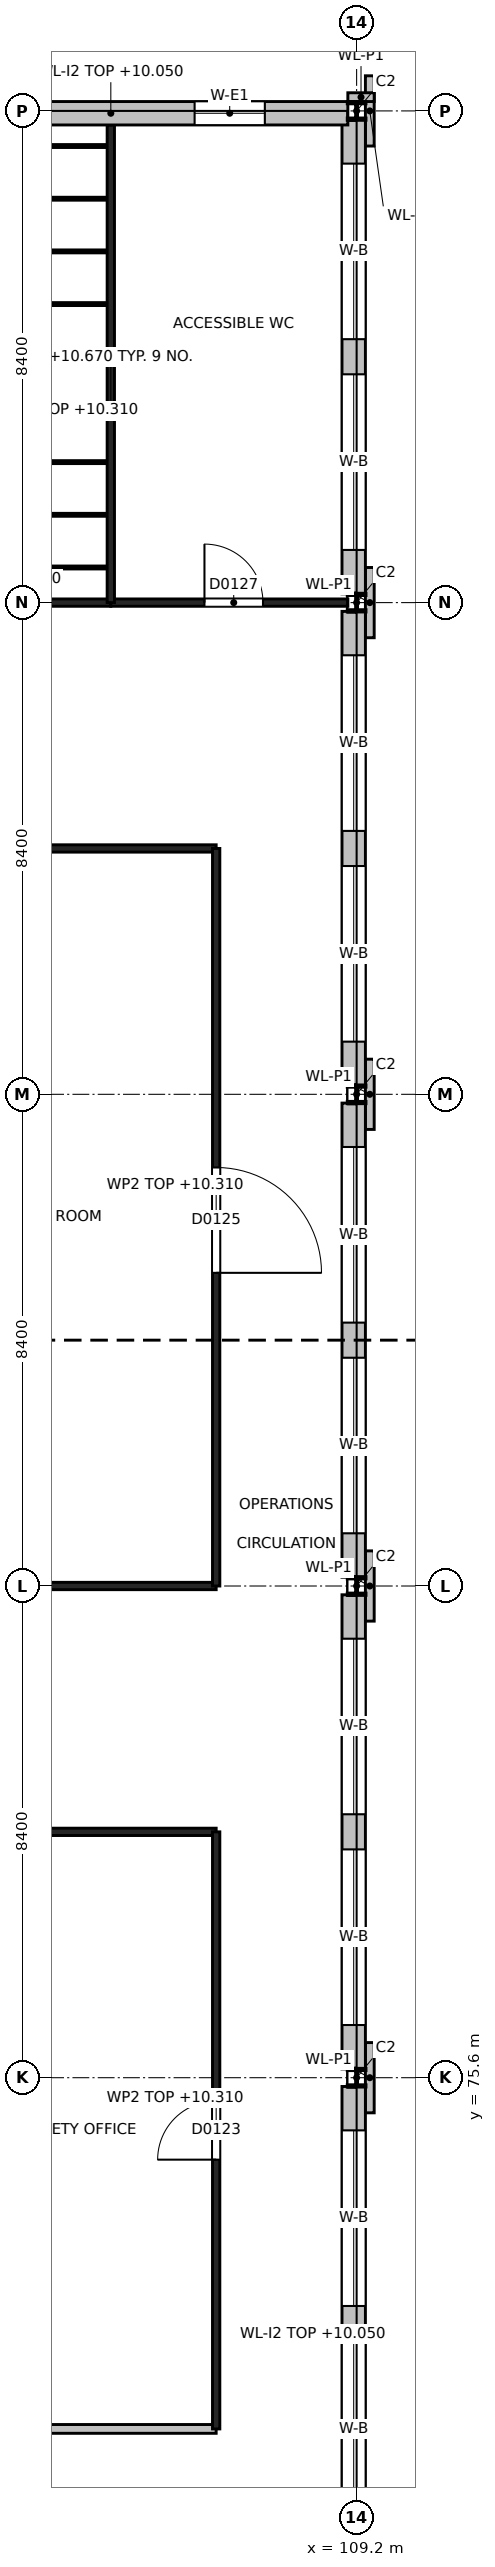
"""IFC4 building model, lengths in metres.
Left out: names, types, materials, properties, quantities, classifications, styles, units other than length and angle.
Written with IfcOpenShell. Run it as: python <this file> out.ifc"""

import sys

from ifc_helpers import new_model, si_unit, direction, frame, frame_2d, origin, origin_2d, place, context, subcontext, project, spatial, rectangle, i_section, extrude, element, fill, save


model = new_model("IFC4")
c1 = context("Model", 3, precision=1e-05, world=origin(), true_north=direction((0.0, 1.0)))
c2 = subcontext(c1, "Body", "Model", "MODEL_VIEW")
j1 = project(units=[si_unit("LENGTHUNIT", "METRE"), si_unit("PLANEANGLEUNIT", "RADIAN")], contexts=[c1])
p1 = place(None, origin())
s1 = spatial("IfcSite", under=j1, at=p1, CompositionType="ELEMENT")
p2 = place(p1, origin())
s2 = spatial("IfcBuilding", under=s1, at=p2, CompositionType="ELEMENT")
p3 = place(p2, frame((0.0, 0.0, 6.0)))
s3 = spatial("IfcBuildingStorey", under=s2, at=p3, CompositionType="ELEMENT", Elevation=6.0)
for number, where, z_axis, x_axis in (
    (1, (109.2, 75.6, 0.0), (0.0, 0.0, 1.0), (1.0, 0.0, 0.0)),
    (2, (109.2, 84.0, 0.0), (0.0, 0.0, 1.0), (1.0, 0.0, 0.0)),
    (3, (109.2, 92.4, 0.0), (0.0, 0.0, 1.0), (1.0, 0.0, 0.0)),
    (4, (109.2, 100.8, 0.0), (0.0, 0.0, 1.0), (1.0, 0.0, 0.0)),
    (5, (109.2, 109.2, 0.0), (0.0, 0.0, 1.0), (1.0, 0.0, 0.0)),
):
    element("IfcColumn", number, at=place(p3, frame(where, z_axis=z_axis, x_axis=x_axis)), inside=s3, PredefinedType="COLUMN", context=c2, shape_type="SweptSolid", body=[
        extrude(i_section(OverallWidth=0.3, OverallDepth=0.3, WebThickness=0.011, FlangeThickness=0.019, at=origin_2d()), origin(), (0.0, 0.0, 1.0), 4.8),
    ])
p4 = place(p3, frame((100.95, 109.16, 0.0), z_axis=(0.0, 0.0, 1.0), x_axis=(1.0, 0.0, 0.0)))
e6 = element("IfcWall", 6, at=p4, inside=s3, PredefinedType="SOLIDWALL", context=c2, shape_type="SweptSolid", body=[
    extrude(rectangle(XDim=8.1, YDim=0.4, at=frame_2d((4.05, 0.0))), origin(), (0.0, 0.0, 1.0), 4.05),
])
p5 = place(p4, frame((1.419, 0.0, 0.9)))
e7 = element("IfcOpeningElement", 7, at=p5, cuts=e6, PredefinedType="OPENING", context=c2, shape_type="SweptSolid", body=[
    extrude(rectangle(XDim=1.2, YDim=3.0, at=frame_2d((0.6, 1.5))), frame((0.0, 0.2, 0.0), z_axis=(0.0, -1.0, 0.0), x_axis=(1.0, 0.0, 0.0)), (0.0, 0.0, 1.0), 0.4),
])
p6 = place(p4, frame((5.481, 0.0, 0.9)))
e8 = element("IfcOpeningElement", 8, at=p6, cuts=e6, PredefinedType="OPENING", context=c2, shape_type="SweptSolid", body=[
    extrude(rectangle(XDim=1.2, YDim=3.0, at=frame_2d((0.6, 1.5))), frame((0.0, 0.2, 0.0), z_axis=(0.0, -1.0, 0.0), x_axis=(1.0, 0.0, 0.0)), (0.0, 0.0, 1.0), 0.4),
])
p7 = place(p3, frame((109.05, 109.435, 0.0), z_axis=(0.0, 0.0, 1.0), x_axis=(1.0, 0.0, 0.0)))
e9 = element("IfcWall", 9, at=p7, inside=s3, PredefinedType="SOLIDWALL", context=c2, shape_type="SweptSolid", body=[
    extrude(rectangle(XDim=0.45, YDim=0.15, at=frame_2d((0.225, 0.0))), origin(), (0.0, 0.0, 1.0), 4.8),
])
p8 = place(p3, frame((109.15, 67.0, 0.0), z_axis=(0.0, 0.0, 1.0), x_axis=(0.0, 1.0, 0.0)))
e10 = element("IfcWall", 10, at=p8, inside=s3, PredefinedType="SOLIDWALL", context=c2, shape_type="SweptSolid", body=[
    extrude(rectangle(XDim=8.45, YDim=0.4, at=frame_2d((4.225, 0.0))), origin(), (0.0, 0.0, 1.0), 4.05),
])
p9 = place(p8, frame((1.1, 0.0, 0.9)))
e11 = element("IfcOpeningElement", 11, at=p9, cuts=e10, PredefinedType="OPENING", context=c2, shape_type="SweptSolid", body=[
    extrude(rectangle(XDim=3.0, YDim=3.0, at=frame_2d((1.5, 1.5))), frame((0.0, 0.2, 0.0), z_axis=(0.0, -1.0, 0.0), x_axis=(1.0, 0.0, 0.0)), (0.0, 0.0, 1.0), 0.4),
])
p10 = place(p8, frame((4.7, 0.0, 0.9)))
e12 = element("IfcOpeningElement", 12, at=p10, cuts=e10, PredefinedType="OPENING", context=c2, shape_type="SweptSolid", body=[
    extrude(rectangle(XDim=3.0, YDim=3.0, at=frame_2d((1.5, 1.5))), frame((0.0, 0.2, 0.0), z_axis=(0.0, -1.0, 0.0), x_axis=(1.0, 0.0, 0.0)), (0.0, 0.0, 1.0), 0.4),
])
p11 = place(p3, frame((109.15, 75.75, 0.0), z_axis=(0.0, 0.0, 1.0), x_axis=(0.0, 1.0, 0.0)))
e13 = element("IfcWall", 13, at=p11, inside=s3, PredefinedType="SOLIDWALL", context=c2, shape_type="SweptSolid", body=[
    extrude(rectangle(XDim=8.1, YDim=0.4, at=frame_2d((4.05, 0.0))), origin(), (0.0, 0.0, 1.0), 4.05),
])
p12 = place(p11, frame((0.75, 0.0, 0.9)))
e14 = element("IfcOpeningElement", 14, at=p12, cuts=e13, PredefinedType="OPENING", context=c2, shape_type="SweptSolid", body=[
    extrude(rectangle(XDim=3.0, YDim=3.0, at=frame_2d((1.5, 1.5))), frame((0.0, 0.2, 0.0), z_axis=(0.0, -1.0, 0.0), x_axis=(1.0, 0.0, 0.0)), (0.0, 0.0, 1.0), 0.4),
])
p13 = place(p11, frame((4.35, 0.0, 0.9)))
e15 = element("IfcOpeningElement", 15, at=p13, cuts=e13, PredefinedType="OPENING", context=c2, shape_type="SweptSolid", body=[
    extrude(rectangle(XDim=3.0, YDim=3.0, at=frame_2d((1.5, 1.5))), frame((0.0, 0.2, 0.0), z_axis=(0.0, -1.0, 0.0), x_axis=(1.0, 0.0, 0.0)), (0.0, 0.0, 1.0), 0.4),
])
p14 = place(p3, frame((109.15, 84.15, 0.0), z_axis=(0.0, 0.0, 1.0), x_axis=(0.0, 1.0, 0.0)))
e16 = element("IfcWall", 16, at=p14, inside=s3, PredefinedType="SOLIDWALL", context=c2, shape_type="SweptSolid", body=[
    extrude(rectangle(XDim=8.1, YDim=0.4, at=frame_2d((4.05, 0.0))), origin(), (0.0, 0.0, 1.0), 4.05),
])
p15 = place(p14, frame((0.75, 0.0, 0.9)))
e17 = element("IfcOpeningElement", 17, at=p15, cuts=e16, PredefinedType="OPENING", context=c2, shape_type="SweptSolid", body=[
    extrude(rectangle(XDim=3.0, YDim=3.0, at=frame_2d((1.5, 1.5))), frame((0.0, 0.2, 0.0), z_axis=(0.0, -1.0, 0.0), x_axis=(1.0, 0.0, 0.0)), (0.0, 0.0, 1.0), 0.4),
])
p16 = place(p14, frame((4.35, 0.0, 0.9)))
e18 = element("IfcOpeningElement", 18, at=p16, cuts=e16, PredefinedType="OPENING", context=c2, shape_type="SweptSolid", body=[
    extrude(rectangle(XDim=3.0, YDim=3.0, at=frame_2d((1.5, 1.5))), frame((0.0, 0.2, 0.0), z_axis=(0.0, -1.0, 0.0), x_axis=(1.0, 0.0, 0.0)), (0.0, 0.0, 1.0), 0.4),
])
p17 = place(p3, frame((109.15, 92.55, 0.0), z_axis=(0.0, 0.0, 1.0), x_axis=(0.0, 1.0, 0.0)))
e19 = element("IfcWall", 19, at=p17, inside=s3, PredefinedType="SOLIDWALL", context=c2, shape_type="SweptSolid", body=[
    extrude(rectangle(XDim=8.1, YDim=0.4, at=frame_2d((4.05, 0.0))), origin(), (0.0, 0.0, 1.0), 4.05),
])
p18 = place(p17, frame((0.75, 0.0, 0.9)))
e20 = element("IfcOpeningElement", 20, at=p18, cuts=e19, PredefinedType="OPENING", context=c2, shape_type="SweptSolid", body=[
    extrude(rectangle(XDim=3.0, YDim=3.0, at=frame_2d((1.5, 1.5))), frame((0.0, 0.2, 0.0), z_axis=(0.0, -1.0, 0.0), x_axis=(1.0, 0.0, 0.0)), (0.0, 0.0, 1.0), 0.4),
])
p19 = place(p17, frame((4.35, 0.0, 0.9)))
e21 = element("IfcOpeningElement", 21, at=p19, cuts=e19, PredefinedType="OPENING", context=c2, shape_type="SweptSolid", body=[
    extrude(rectangle(XDim=3.0, YDim=3.0, at=frame_2d((1.5, 1.5))), frame((0.0, 0.2, 0.0), z_axis=(0.0, -1.0, 0.0), x_axis=(1.0, 0.0, 0.0)), (0.0, 0.0, 1.0), 0.4),
])
p20 = place(p3, frame((109.15, 100.95, 0.0), z_axis=(0.0, 0.0, 1.0), x_axis=(0.0, 1.0, 0.0)))
e22 = element("IfcWall", 22, at=p20, inside=s3, PredefinedType="SOLIDWALL", context=c2, shape_type="SweptSolid", body=[
    extrude(rectangle(XDim=8.1, YDim=0.4, at=frame_2d((4.05, 0.0))), origin(), (0.0, 0.0, 1.0), 4.05),
])
p21 = place(p20, frame((0.75, 0.0, 0.9)))
e23 = element("IfcOpeningElement", 23, at=p21, cuts=e22, PredefinedType="OPENING", context=c2, shape_type="SweptSolid", body=[
    extrude(rectangle(XDim=3.0, YDim=3.0, at=frame_2d((1.5, 1.5))), frame((0.0, 0.2, 0.0), z_axis=(0.0, -1.0, 0.0), x_axis=(1.0, 0.0, 0.0)), (0.0, 0.0, 1.0), 0.4),
])
p22 = place(p20, frame((4.35, 0.0, 0.9)))
e24 = element("IfcOpeningElement", 24, at=p22, cuts=e22, PredefinedType="OPENING", context=c2, shape_type="SweptSolid", body=[
    extrude(rectangle(XDim=3.0, YDim=3.0, at=frame_2d((1.5, 1.5))), frame((0.0, 0.2, 0.0), z_axis=(0.0, -1.0, 0.0), x_axis=(1.0, 0.0, 0.0)), (0.0, 0.0, 1.0), 0.4),
])
p23 = place(p3, frame((109.425, 75.0, 0.0), z_axis=(0.0, 0.0, 1.0), x_axis=(0.0, 1.0, 0.0)))
e25 = element("IfcWall", 25, at=p23, inside=s3, PredefinedType="SOLIDWALL", context=c2, shape_type="SweptSolid", body=[
    extrude(rectangle(XDim=1.2, YDim=0.15, at=frame_2d((0.6, 0.0))), origin(), (0.0, 0.0, 1.0), 4.8),
])
p24 = place(p3, frame((109.425, 83.4, 0.0), z_axis=(0.0, 0.0, 1.0), x_axis=(0.0, 1.0, 0.0)))
e26 = element("IfcWall", 26, at=p24, inside=s3, PredefinedType="SOLIDWALL", context=c2, shape_type="SweptSolid", body=[
    extrude(rectangle(XDim=1.2, YDim=0.15, at=frame_2d((0.6, 0.0))), origin(), (0.0, 0.0, 1.0), 4.8),
])
for number, where, z_axis, x_axis in (
    (27, (109.425, 91.8, 0.0), (0.0, 0.0, 1.0), (0.0, 1.0, 0.0)),
    (28, (109.425, 100.2, 0.0), (0.0, 0.0, 1.0), (0.0, 1.0, 0.0)),
    (29, (109.425, 108.6, 0.0), (0.0, 0.0, 1.0), (0.0, 1.0, 0.0)),
):
    element("IfcWall", number, at=place(p3, frame(where, z_axis=z_axis, x_axis=x_axis)), inside=s3, PredefinedType="SOLIDWALL", context=c2, shape_type="SweptSolid", body=[
        extrude(rectangle(XDim=1.2, YDim=0.15, at=frame_2d((0.6, 0.0))), origin(), (0.0, 0.0, 1.0), 4.8),
    ])
p25 = place(p3, frame((100.8, 69.6, 0.0), z_axis=(0.0, 0.0, 1.0), x_axis=(1.0, 0.0, 0.0)))
e30 = element("IfcWall", 30, at=p25, inside=s3, PredefinedType="PARTITIONING", context=c2, shape_type="SweptSolid", body=[
    extrude(rectangle(XDim=6.0, YDim=0.15, at=frame_2d((3.0, 0.0))), origin(), (0.0, 0.0, 1.0), 4.28),
])
p26 = place(p3, frame((100.8, 79.8, 0.0), z_axis=(0.0, 0.0, 1.0), x_axis=(1.0, 0.0, 0.0)))
e31 = element("IfcWall", 31, at=p26, inside=s3, PredefinedType="PARTITIONING", context=c2, shape_type="SweptSolid", body=[
    extrude(rectangle(XDim=6.0, YDim=0.125, at=frame_2d((3.0, 0.0))), origin(), (0.0, 0.0, 1.0), 4.28),
])
p27 = place(p3, frame((106.8, 69.6, 0.0), z_axis=(0.0, 0.0, 1.0), x_axis=(0.0, 1.0, 0.0)))
e32 = element("IfcWall", 32, at=p27, inside=s3, PredefinedType="PARTITIONING", context=c2, shape_type="SweptSolid", body=[
    extrude(rectangle(XDim=10.2, YDim=0.125, at=frame_2d((5.1, 0.0))), origin(), (0.0, 0.0, 1.0), 4.31),
])
p28 = place(p27, frame((4.6, 0.0, 0.0)))
e33 = element("IfcOpeningElement", 33, at=p28, cuts=e32, PredefinedType="OPENING", context=c2, shape_type="SweptSolid", body=[
    extrude(rectangle(XDim=1.0, YDim=2.2, at=frame_2d((0.5, 1.1))), frame((0.0, 0.062, 0.0), z_axis=(0.0, -1.0, 0.0), x_axis=(1.0, 0.0, 0.0)), (0.0, 0.0, 1.0), 0.125),
])
p29 = place(p3, frame((100.95, 84.0, 0.0), z_axis=(0.0, 0.0, 1.0), x_axis=(1.0, 0.0, 0.0)))
e34 = element("IfcWall", 34, at=p29, inside=s3, PredefinedType="PARTITIONING", context=c2, shape_type="SweptSolid", body=[
    extrude(rectangle(XDim=5.85, YDim=0.125, at=frame_2d((2.925, 0.0))), origin(), (0.0, 0.0, 1.0), 4.31),
])
p30 = place(p3, frame((100.8, 96.6, 0.0), z_axis=(0.0, 0.0, 1.0), x_axis=(1.0, 0.0, 0.0)))
e35 = element("IfcWall", 35, at=p30, inside=s3, PredefinedType="PARTITIONING", context=c2, shape_type="SweptSolid", body=[
    extrude(rectangle(XDim=6.0, YDim=0.125, at=frame_2d((3.0, 0.0))), origin(), (0.0, 0.0, 1.0), 4.28),
])
p31 = place(p3, frame((106.8, 84.0, 0.0), z_axis=(0.0, 0.0, 1.0), x_axis=(0.0, 1.0, 0.0)))
e36 = element("IfcWall", 36, at=p31, inside=s3, PredefinedType="PARTITIONING", context=c2, shape_type="SweptSolid", body=[
    extrude(rectangle(XDim=12.6, YDim=0.125, at=frame_2d((6.3, 0.0))), origin(), (0.0, 0.0, 1.0), 4.31),
])
p32 = place(p31, frame((5.35, 0.0, 0.0)))
e37 = element("IfcOpeningElement", 37, at=p32, cuts=e36, PredefinedType="OPENING", context=c2, shape_type="SweptSolid", body=[
    extrude(rectangle(XDim=1.8, YDim=2.1, at=frame_2d((0.9, 1.05))), frame((0.0, 0.062, 0.0), z_axis=(0.0, -1.0, 0.0), x_axis=(1.0, 0.0, 0.0)), (0.0, 0.0, 1.0), 0.125),
])
p33 = place(p3, frame((100.95, 100.8, 0.0), z_axis=(0.0, 0.0, 1.0), x_axis=(1.0, 0.0, 0.0)))
e38 = element("IfcWall", 38, at=p33, inside=s3, PredefinedType="PARTITIONING", context=c2, shape_type="SweptSolid", body=[
    extrude(rectangle(XDim=4.05, YDim=0.125, at=frame_2d((2.025, 0.0))), origin(), (0.0, 0.0, 1.0), 4.31),
])
p34 = place(p3, frame((105.0, 100.8, 0.0), z_axis=(0.0, 0.0, 1.0), x_axis=(1.0, 0.0, 0.0)))
e39 = element("IfcWall", 39, at=p34, inside=s3, PredefinedType="PARTITIONING", context=c2, shape_type="SweptSolid", body=[
    extrude(rectangle(XDim=4.05, YDim=0.125, at=frame_2d((2.025, 0.0))), origin(), (0.0, 0.0, 1.0), 4.31),
])
p35 = place(p34, frame((1.6, 0.0, 0.0)))
e40 = element("IfcOpeningElement", 40, at=p35, cuts=e39, PredefinedType="OPENING", context=c2, shape_type="SweptSolid", body=[
    extrude(rectangle(XDim=1.0, YDim=2.1, at=frame_2d((0.5, 1.05))), frame((0.0, 0.062, 0.0), z_axis=(0.0, -1.0, 0.0), x_axis=(1.0, 0.0, 0.0)), (0.0, 0.0, 1.0), 0.125),
])
p36 = place(p3, frame((105.0, 100.8, 0.0), z_axis=(0.0, 0.0, 1.0), x_axis=(0.0, 1.0, 0.0)))
e41 = element("IfcWall", 41, at=p36, inside=s3, PredefinedType="PARTITIONING", context=c2, shape_type="SweptSolid", body=[
    extrude(rectangle(XDim=8.159, YDim=0.125, at=frame_2d((4.08, 0.0))), origin(), (0.0, 0.0, 1.0), 4.31),
])
for number, where, z_axis, x_axis in (
    (42, (105.0, 101.4, 0.0), (0.0, 0.0, 1.0), (-1.0, 0.0, 0.0)),
    (43, (105.0, 102.3, 0.0), (0.0, 0.0, 1.0), (-1.0, 0.0, 0.0)),
    (44, (105.0, 103.2, 0.0), (0.0, 0.0, 1.0), (-1.0, 0.0, 0.0)),
    (45, (105.0, 104.1, 0.0), (0.0, 0.0, 1.0), (-1.0, 0.0, 0.0)),
    (46, (105.0, 105.0, 0.0), (0.0, 0.0, 1.0), (-1.0, 0.0, 0.0)),
    (47, (105.0, 105.9, 0.0), (0.0, 0.0, 1.0), (-1.0, 0.0, 0.0)),
    (48, (105.0, 106.8, 0.0), (0.0, 0.0, 1.0), (-1.0, 0.0, 0.0)),
    (49, (105.0, 107.7, 0.0), (0.0, 0.0, 1.0), (-1.0, 0.0, 0.0)),
    (50, (105.0, 108.6, 0.0), (0.0, 0.0, 1.0), (-1.0, 0.0, 0.0)),
):
    element("IfcWall", number, at=place(p3, frame(where, z_axis=z_axis, x_axis=x_axis)), inside=s3, PredefinedType="PARTITIONING", context=c2, shape_type="SweptSolid", body=[
        extrude(rectangle(XDim=1.7, YDim=0.05, at=frame_2d((0.85, 0.0))), origin(), (0.0, 0.0, 1.0), 4.67),
    ])
p37 = place(p6, origin())
e51 = element("IfcWindow", 51, at=p37, inside=s3, PartitioningType="SINGLE_PANEL", PredefinedType="WINDOW", context=c2, shape_type="SweptSolid", body=[
    extrude(rectangle(XDim=1.2, YDim=3.0, at=frame_2d((0.6, 1.5))), frame((0.0, 0.03, 0.0), z_axis=(0.0, -1.0, 0.0), x_axis=(1.0, 0.0, 0.0)), (0.0, 0.0, 1.0), 0.06),
])
fill(e8, e51)
p38 = place(p9, origin())
e52 = element("IfcWindow", 52, at=p38, inside=s3, PartitioningType="SINGLE_PANEL", PredefinedType="WINDOW", context=c2, shape_type="SweptSolid", body=[
    extrude(rectangle(XDim=3.0, YDim=3.0, at=frame_2d((1.5, 1.5))), frame((0.0, 0.03, 0.0), z_axis=(0.0, -1.0, 0.0), x_axis=(1.0, 0.0, 0.0)), (0.0, 0.0, 1.0), 0.06),
])
fill(e11, e52)
p39 = place(p10, origin())
e53 = element("IfcWindow", 53, at=p39, inside=s3, PartitioningType="SINGLE_PANEL", PredefinedType="WINDOW", context=c2, shape_type="SweptSolid", body=[
    extrude(rectangle(XDim=3.0, YDim=3.0, at=frame_2d((1.5, 1.5))), frame((0.0, 0.03, 0.0), z_axis=(0.0, -1.0, 0.0), x_axis=(1.0, 0.0, 0.0)), (0.0, 0.0, 1.0), 0.06),
])
fill(e12, e53)
p40 = place(p12, origin())
e54 = element("IfcWindow", 54, at=p40, inside=s3, PartitioningType="SINGLE_PANEL", PredefinedType="WINDOW", context=c2, shape_type="SweptSolid", body=[
    extrude(rectangle(XDim=3.0, YDim=3.0, at=frame_2d((1.5, 1.5))), frame((0.0, 0.03, 0.0), z_axis=(0.0, -1.0, 0.0), x_axis=(1.0, 0.0, 0.0)), (0.0, 0.0, 1.0), 0.06),
])
fill(e14, e54)
p41 = place(p13, origin())
e55 = element("IfcWindow", 55, at=p41, inside=s3, PartitioningType="SINGLE_PANEL", PredefinedType="WINDOW", context=c2, shape_type="SweptSolid", body=[
    extrude(rectangle(XDim=3.0, YDim=3.0, at=frame_2d((1.5, 1.5))), frame((0.0, 0.03, 0.0), z_axis=(0.0, -1.0, 0.0), x_axis=(1.0, 0.0, 0.0)), (0.0, 0.0, 1.0), 0.06),
])
fill(e15, e55)
p42 = place(p15, origin())
e56 = element("IfcWindow", 56, at=p42, inside=s3, PartitioningType="SINGLE_PANEL", PredefinedType="WINDOW", context=c2, shape_type="SweptSolid", body=[
    extrude(rectangle(XDim=3.0, YDim=3.0, at=frame_2d((1.5, 1.5))), frame((0.0, 0.03, 0.0), z_axis=(0.0, -1.0, 0.0), x_axis=(1.0, 0.0, 0.0)), (0.0, 0.0, 1.0), 0.06),
])
fill(e17, e56)
p43 = place(p16, origin())
e57 = element("IfcWindow", 57, at=p43, inside=s3, PartitioningType="SINGLE_PANEL", PredefinedType="WINDOW", context=c2, shape_type="SweptSolid", body=[
    extrude(rectangle(XDim=3.0, YDim=3.0, at=frame_2d((1.5, 1.5))), frame((0.0, 0.03, 0.0), z_axis=(0.0, -1.0, 0.0), x_axis=(1.0, 0.0, 0.0)), (0.0, 0.0, 1.0), 0.06),
])
fill(e18, e57)
p44 = place(p18, origin())
e58 = element("IfcWindow", 58, at=p44, inside=s3, PartitioningType="SINGLE_PANEL", PredefinedType="WINDOW", context=c2, shape_type="SweptSolid", body=[
    extrude(rectangle(XDim=3.0, YDim=3.0, at=frame_2d((1.5, 1.5))), frame((0.0, 0.03, 0.0), z_axis=(0.0, -1.0, 0.0), x_axis=(1.0, 0.0, 0.0)), (0.0, 0.0, 1.0), 0.06),
])
fill(e20, e58)
p45 = place(p19, origin())
e59 = element("IfcWindow", 59, at=p45, inside=s3, PartitioningType="SINGLE_PANEL", PredefinedType="WINDOW", context=c2, shape_type="SweptSolid", body=[
    extrude(rectangle(XDim=3.0, YDim=3.0, at=frame_2d((1.5, 1.5))), frame((0.0, 0.03, 0.0), z_axis=(0.0, -1.0, 0.0), x_axis=(1.0, 0.0, 0.0)), (0.0, 0.0, 1.0), 0.06),
])
fill(e21, e59)
p46 = place(p21, origin())
e60 = element("IfcWindow", 60, at=p46, inside=s3, PartitioningType="SINGLE_PANEL", PredefinedType="WINDOW", context=c2, shape_type="SweptSolid", body=[
    extrude(rectangle(XDim=3.0, YDim=3.0, at=frame_2d((1.5, 1.5))), frame((0.0, 0.03, 0.0), z_axis=(0.0, -1.0, 0.0), x_axis=(1.0, 0.0, 0.0)), (0.0, 0.0, 1.0), 0.06),
])
fill(e23, e60)
p47 = place(p22, origin())
e61 = element("IfcWindow", 61, at=p47, inside=s3, PartitioningType="SINGLE_PANEL", PredefinedType="WINDOW", context=c2, shape_type="SweptSolid", body=[
    extrude(rectangle(XDim=3.0, YDim=3.0, at=frame_2d((1.5, 1.5))), frame((0.0, 0.03, 0.0), z_axis=(0.0, -1.0, 0.0), x_axis=(1.0, 0.0, 0.0)), (0.0, 0.0, 1.0), 0.06),
])
fill(e24, e61)
p48 = place(p28, origin())
e62 = element("IfcDoor", 62, at=p48, inside=s3, OperationType="SINGLE_SWING_LEFT", PredefinedType="DOOR", context=c2, shape_type="SweptSolid", body=[
    extrude(rectangle(XDim=1.0, YDim=2.2, at=frame_2d((0.5, 1.1))), frame((0.0, 0.025, 0.0), z_axis=(0.0, -1.0, 0.0), x_axis=(1.0, 0.0, 0.0)), (0.0, 0.0, 1.0), 0.05),
])
fill(e33, e62)
p49 = place(p32, origin())
e63 = element("IfcDoor", 63, at=p49, inside=s3, OperationType="DOUBLE_DOOR_DOUBLE_SWING", PredefinedType="DOOR", context=c2, shape_type="SweptSolid", body=[
    extrude(rectangle(XDim=1.8, YDim=2.1, at=frame_2d((0.9, 1.05))), frame((0.0, 0.025, 0.0), z_axis=(0.0, -1.0, 0.0), x_axis=(1.0, 0.0, 0.0)), (0.0, 0.0, 1.0), 0.05),
])
fill(e37, e63)
p50 = place(p35, origin())
e64 = element("IfcDoor", 64, at=p50, inside=s3, OperationType="SINGLE_SWING_LEFT", PredefinedType="DOOR", context=c2, shape_type="SweptSolid", body=[
    extrude(rectangle(XDim=1.0, YDim=2.1, at=frame_2d((0.5, 1.05))), frame((0.0, 0.025, 0.0), z_axis=(0.0, -1.0, 0.0), x_axis=(1.0, 0.0, 0.0)), (0.0, 0.0, 1.0), 0.05),
])
fill(e40, e64)
save(model, sys.argv[1])
